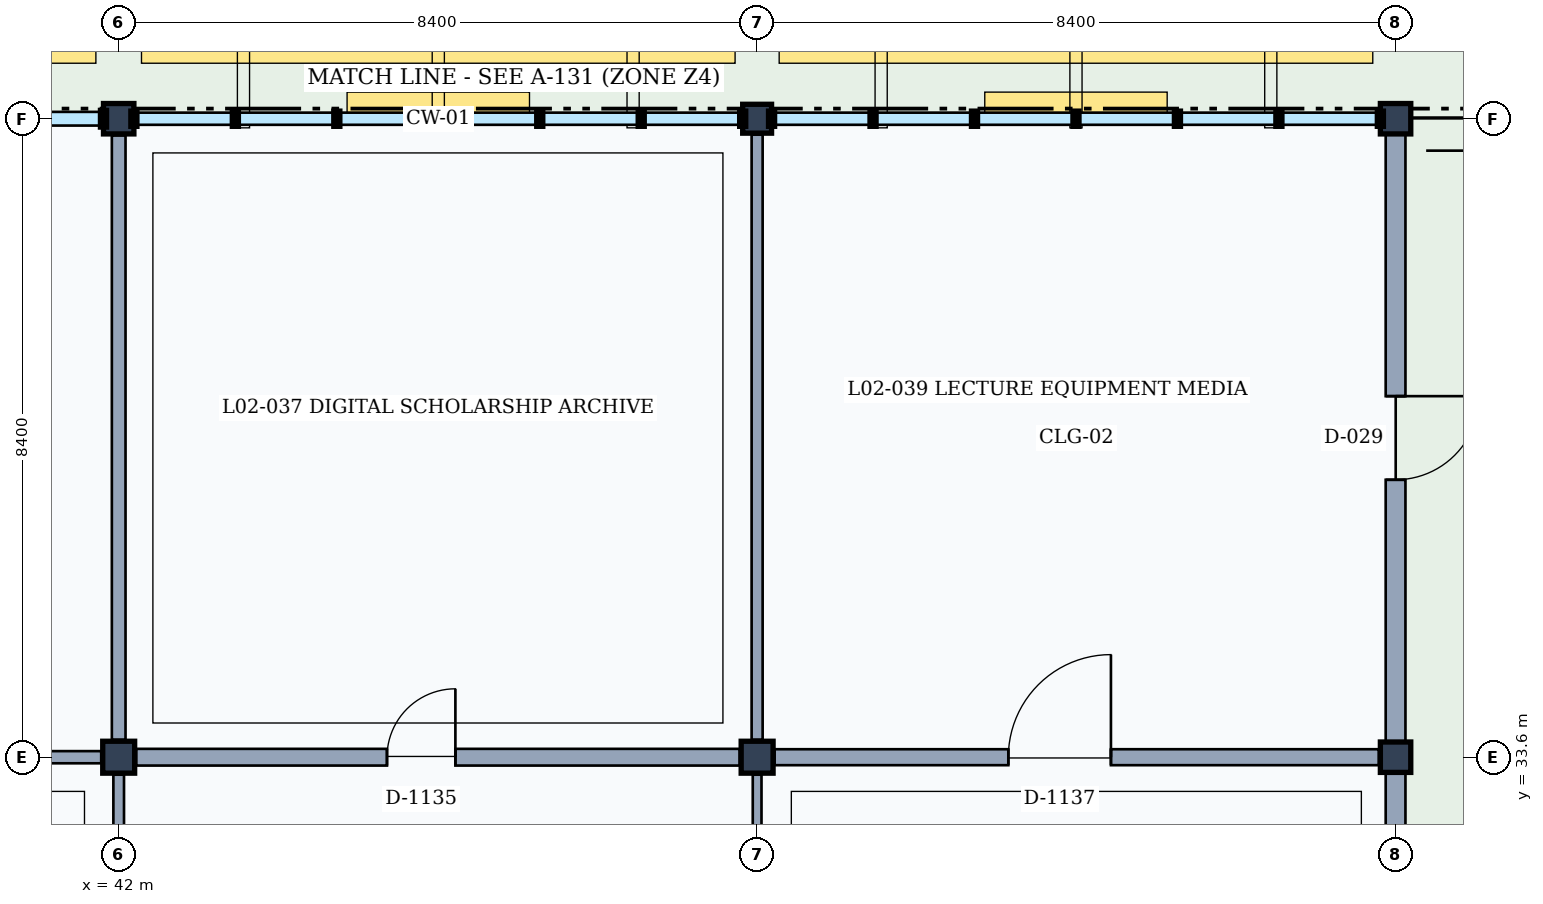
"""IFC4 building model, lengths in metres.
Left out: names, types, materials, properties, quantities, classifications, styles, units other than length and angle.
Written with IfcOpenShell. Run it as: python <this file> out.ifc"""

import sys

from ifc_helpers import new_model, si_unit, direction, frame, frame_2d, origin, origin_2d, place, context, subcontext, project, spatial, rectangle, extrude, element, fill, save


model = new_model("IFC4")
c1 = context("Model", 3, precision=1e-05, world=origin(), true_north=direction((0.0, 1.0)))
c2 = subcontext(c1, "Body", "Model", "MODEL_VIEW")
j1 = project(units=[si_unit("LENGTHUNIT", "METRE"), si_unit("PLANEANGLEUNIT", "RADIAN")], contexts=[c1])
p1 = place(None, origin())
s1 = spatial("IfcSite", under=j1, at=p1, CompositionType="ELEMENT")
p2 = place(p1, origin())
s2 = spatial("IfcBuilding", under=s1, at=p2, CompositionType="ELEMENT")
p3 = place(p2, frame((0.0, 0.0, 9.6)))
s3 = spatial("IfcBuildingStorey", under=s2, at=p3, CompositionType="ELEMENT", Elevation=9.6)
p4 = place(p3, frame((42.0, 33.6, 0.0), z_axis=(0.0, 0.0, 1.0), x_axis=(1.0, 0.0, 0.0)))
e1 = element("IfcColumn", 1, at=p4, inside=s3, PredefinedType="COLUMN", context=c2, shape_type="SweptSolid", body=[
    extrude(rectangle(XDim=0.42, YDim=0.42, at=origin_2d()), origin(), (0.0, 0.0, 1.0), 4.2),
])
p5 = place(p3, frame((42.0, 42.0, 0.0), z_axis=(0.0, 0.0, 1.0), x_axis=(1.0, 0.0, 0.0)))
e2 = element("IfcColumn", 2, at=p5, inside=s3, PredefinedType="COLUMN", context=c2, shape_type="SweptSolid", body=[
    extrude(rectangle(XDim=0.4, YDim=0.4, at=origin_2d()), origin(), (0.0, 0.0, 1.0), 4.2),
])
p6 = place(p3, frame((50.4, 33.6, 0.0), z_axis=(0.0, 0.0, 1.0), x_axis=(1.0, 0.0, 0.0)))
e3 = element("IfcColumn", 3, at=p6, inside=s3, PredefinedType="COLUMN", context=c2, shape_type="SweptSolid", body=[
    extrude(rectangle(XDim=0.42, YDim=0.42, at=origin_2d()), origin(), (0.0, 0.0, 1.0), 4.2),
])
p7 = place(p3, frame((50.4, 42.0, 0.0), z_axis=(0.0, 0.0, 1.0), x_axis=(1.0, 0.0, 0.0)))
e4 = element("IfcColumn", 4, at=p7, inside=s3, PredefinedType="COLUMN", context=c2, shape_type="SweptSolid", body=[
    extrude(rectangle(XDim=0.38, YDim=0.38, at=origin_2d()), origin(), (0.0, 0.0, 1.0), 4.2),
])
for number, where, z_axis, x_axis in (
    (5, (58.8, 33.6, 0.0), (0.0, 0.0, 1.0), (1.0, 0.0, 0.0)),
    (6, (58.8, 42.0, 0.0), (0.0, 0.0, 1.0), (1.0, 0.0, 0.0)),
):
    element("IfcColumn", number, at=place(p3, frame(where, z_axis=z_axis, x_axis=x_axis)), inside=s3, PredefinedType="COLUMN", context=c2, shape_type="SweptSolid", body=[
        extrude(rectangle(XDim=0.4, YDim=0.4, at=origin_2d()), origin(), (0.0, 0.0, 1.0), 4.2),
    ])
p8 = place(p3, frame((58.8, 33.4, 0.0), z_axis=(0.0, 0.0, 1.0), x_axis=(0.0, -1.0, 0.0)))
e7 = element("IfcWall", 7, at=p8, inside=s3, PredefinedType="SOLIDWALL", context=c2, shape_type="SweptSolid", body=[
    extrude(rectangle(XDim=8.0, YDim=0.26, at=frame_2d((4.0, 0.0))), origin(), (0.0, 0.0, 1.0), 3.36),
])
p9 = place(p8, frame((3.45, 0.0, 0.0)))
e8 = element("IfcOpeningElement", 8, at=p9, cuts=e7, PredefinedType="OPENING", context=c2, shape_type="SweptSolid", body=[
    extrude(rectangle(XDim=1.1, YDim=2.2, at=frame_2d((0.55, 1.1))), frame((0.0, 0.14, 0.0), z_axis=(0.0, -1.0, 0.0), x_axis=(1.0, 0.0, 0.0)), (0.0, 0.0, 1.0), 0.28),
])
p10 = place(p3, frame((58.8, 41.8, 0.0), z_axis=(0.0, 0.0, 1.0), x_axis=(0.0, -1.0, 0.0)))
e9 = element("IfcWall", 9, at=p10, inside=s3, PredefinedType="SOLIDWALL", context=c2, shape_type="SweptSolid", body=[
    extrude(rectangle(XDim=8.0, YDim=0.26, at=frame_2d((4.0, 0.0))), origin(), (0.0, 0.0, 1.0), 3.36),
])
p11 = place(p10, frame((3.45, 0.0, 0.0)))
e10 = element("IfcOpeningElement", 10, at=p11, cuts=e9, PredefinedType="OPENING", context=c2, shape_type="SweptSolid", body=[
    extrude(rectangle(XDim=1.1, YDim=2.2, at=frame_2d((0.55, 1.1))), frame((0.0, 0.14, 0.0), z_axis=(0.0, -1.0, 0.0), x_axis=(1.0, 0.0, 0.0)), (0.0, 0.0, 1.0), 0.28),
])
p12 = place(p3, frame((42.0, 25.43, 0.0), z_axis=(0.0, 0.0, 1.0), x_axis=(0.0, 1.0, 0.0)))
e11 = element("IfcWall", 11, at=p12, inside=s3, PredefinedType="PARTITIONING", context=c2, shape_type="SweptSolid", body=[
    extrude(rectangle(XDim=7.94, YDim=0.14, at=frame_2d((3.97, 0.0))), origin(), (0.0, 0.0, 1.0), 3.32),
])
p13 = place(p3, frame((33.83, 33.6, 0.0), z_axis=(0.0, 0.0, 1.0), x_axis=(1.0, 0.0, 0.0)))
e12 = element("IfcWall", 12, at=p13, inside=s3, PredefinedType="PARTITIONING", context=c2, shape_type="SweptSolid", body=[
    extrude(rectangle(XDim=7.94, YDim=0.16, at=frame_2d((3.97, 0.0))), origin(), (0.0, 0.0, 1.0), 3.32),
])
p14 = place(p3, frame((42.0, 33.83, 0.0), z_axis=(0.0, 0.0, 1.0), x_axis=(0.0, 1.0, 0.0)))
e13 = element("IfcWall", 13, at=p14, inside=s3, PredefinedType="PARTITIONING", context=c2, shape_type="SweptSolid", body=[
    extrude(rectangle(XDim=7.95, YDim=0.18, at=frame_2d((3.975, 0.0))), origin(), (0.0, 0.0, 1.0), 3.32),
])
p15 = place(p3, frame((50.4, 25.43, 0.0), z_axis=(0.0, 0.0, 1.0), x_axis=(0.0, 1.0, 0.0)))
e14 = element("IfcWall", 14, at=p15, inside=s3, PredefinedType="PARTITIONING", context=c2, shape_type="SweptSolid", body=[
    extrude(rectangle(XDim=7.94, YDim=0.115, at=frame_2d((3.97, 0.0))), origin(), (0.0, 0.0, 1.0), 3.32),
])
p16 = place(p15, frame((2.8, 0.0, 0.0)))
e15 = element("IfcOpeningElement", 15, at=p16, cuts=e14, PredefinedType="OPENING", context=c2, shape_type="SweptSolid", body=[
    extrude(rectangle(XDim=1.9, YDim=2.4, at=frame_2d((0.95, 1.2))), frame((0.0, 0.067, 0.0), z_axis=(0.0, -1.0, 0.0), x_axis=(1.0, 0.0, 0.0)), (0.0, 0.0, 1.0), 0.135),
])
p17 = place(p3, frame((42.23, 33.6, 0.0), z_axis=(0.0, 0.0, 1.0), x_axis=(1.0, 0.0, 0.0)))
e16 = element("IfcWall", 16, at=p17, inside=s3, PredefinedType="PARTITIONING", context=c2, shape_type="SweptSolid", body=[
    extrude(rectangle(XDim=7.94, YDim=0.22, at=frame_2d((3.97, 0.0))), origin(), (0.0, 0.0, 1.0), 3.32),
])
p18 = place(p17, frame((3.3, 0.0, 0.0)))
e17 = element("IfcOpeningElement", 17, at=p18, cuts=e16, PredefinedType="OPENING", context=c2, shape_type="SweptSolid", body=[
    extrude(rectangle(XDim=0.9, YDim=2.1, at=frame_2d((0.45, 1.05))), frame((0.0, 0.12, 0.0), z_axis=(0.0, -1.0, 0.0), x_axis=(1.0, 0.0, 0.0)), (0.0, 0.0, 1.0), 0.24),
])
p19 = place(p3, frame((50.4, 33.83, 0.0), z_axis=(0.0, 0.0, 1.0), x_axis=(0.0, 1.0, 0.0)))
e18 = element("IfcWall", 18, at=p19, inside=s3, PredefinedType="PARTITIONING", context=c2, shape_type="SweptSolid", body=[
    extrude(rectangle(XDim=7.96, YDim=0.145, at=frame_2d((3.98, 0.0))), origin(), (0.0, 0.0, 1.0), 3.32),
])
p20 = place(p3, frame((50.63, 33.6, 0.0), z_axis=(0.0, 0.0, 1.0), x_axis=(1.0, 0.0, 0.0)))
e19 = element("IfcWall", 19, at=p20, inside=s3, PredefinedType="PARTITIONING", context=c2, shape_type="SweptSolid", body=[
    extrude(rectangle(XDim=7.95, YDim=0.21, at=frame_2d((3.975, 0.0))), origin(), (0.0, 0.0, 1.0), 3.32),
])
p21 = place(p20, frame((3.075, 0.0, 0.0)))
e20 = element("IfcOpeningElement", 20, at=p21, cuts=e19, PredefinedType="OPENING", context=c2, shape_type="SweptSolid", body=[
    extrude(rectangle(XDim=1.35, YDim=2.25, at=frame_2d((0.675, 1.125))), frame((0.0, 0.115, 0.0), z_axis=(0.0, -1.0, 0.0), x_axis=(1.0, 0.0, 0.0)), (0.0, 0.0, 1.0), 0.23),
])
p22 = place(p11, origin())
e21 = element("IfcDoor", 21, at=p22, inside=s3, OperationType="SINGLE_SWING_LEFT", PredefinedType="DOOR", context=c2, shape_type="SweptSolid", body=[
    extrude(rectangle(XDim=1.1, YDim=2.2, at=frame_2d((0.55, 1.1))), frame((0.0, 0.025, 0.0), z_axis=(0.0, -1.0, 0.0), x_axis=(1.0, 0.0, 0.0)), (0.0, 0.0, 1.0), 0.05),
])
fill(e10, e21)
p23 = place(p18, origin())
e22 = element("IfcDoor", 22, at=p23, inside=s3, OperationType="SINGLE_SWING_RIGHT", PredefinedType="DOOR", context=c2, shape_type="SweptSolid", body=[
    extrude(rectangle(XDim=0.9, YDim=2.1, at=frame_2d((0.45, 1.05))), frame((0.0, 0.025, 0.0), z_axis=(0.0, -1.0, 0.0), x_axis=(1.0, 0.0, 0.0)), (0.0, 0.0, 1.0), 0.05),
])
fill(e17, e22)
p24 = place(p21, origin())
e23 = element("IfcDoor", 23, at=p24, inside=s3, OperationType="SINGLE_SWING_RIGHT", PredefinedType="DOOR", context=c2, shape_type="SweptSolid", body=[
    extrude(rectangle(XDim=1.35, YDim=2.25, at=frame_2d((0.675, 1.125))), frame((0.0, 0.025, 0.0), z_axis=(0.0, -1.0, 0.0), x_axis=(1.0, 0.0, 0.0)), (0.0, 0.0, 1.0), 0.05),
])
fill(e20, e23)
save(model, sys.argv[1])
